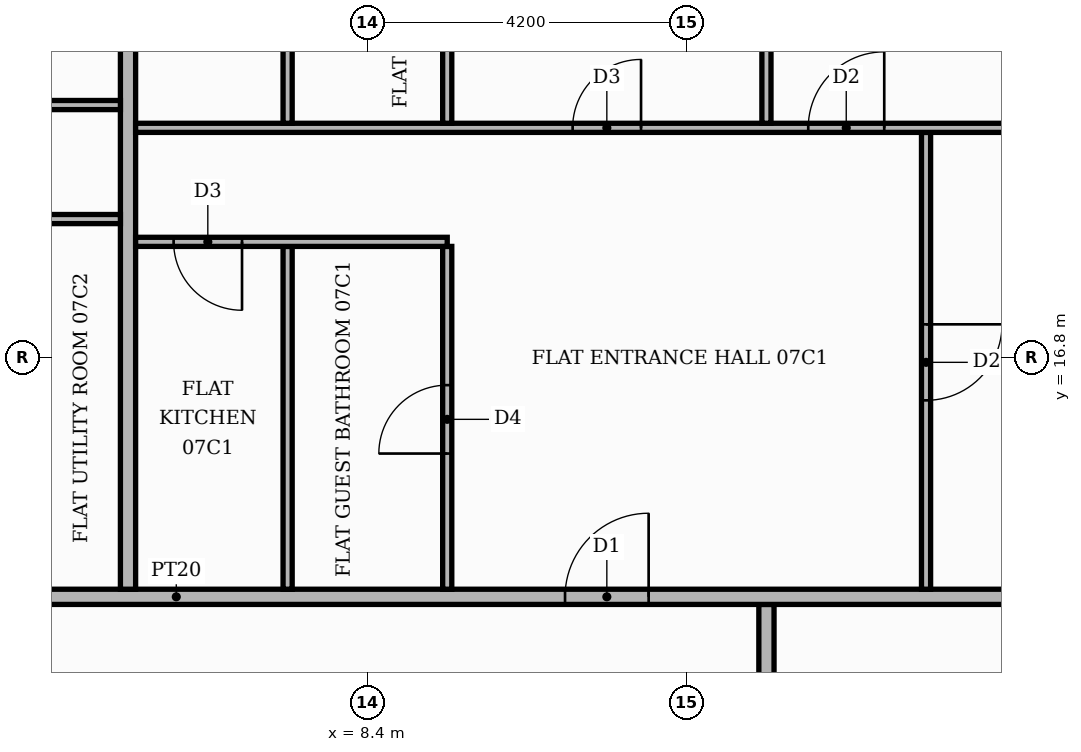
"""IFC4 building model, lengths in metres.
Left out: names, types, materials, properties, quantities, classifications, styles, units other than length and angle.
Written with IfcOpenShell. Run it as: python <this file> out.ifc"""

import sys

from ifc_helpers import new_model, si_unit, direction, frame, frame_2d, origin, place, context, subcontext, project, spatial, rectangle, extrude, element, fill, save


model = new_model("IFC4")
c1 = context("Model", 3, precision=1e-05, world=origin(), true_north=direction((0.0, 1.0)))
c2 = subcontext(c1, "Body", "Model", "MODEL_VIEW")
j1 = project(units=[si_unit("LENGTHUNIT", "METRE"), si_unit("PLANEANGLEUNIT", "RADIAN")], contexts=[c1])
p1 = place(None, origin())
s1 = spatial("IfcSite", under=j1, at=p1, CompositionType="ELEMENT")
p2 = place(p1, origin())
s2 = spatial("IfcBuilding", under=s1, at=p2, CompositionType="ELEMENT")
p3 = place(p2, frame((0.0, 0.0, 34.8)))
s3 = spatial("IfcBuildingStorey", under=s2, at=p3, CompositionType="ELEMENT", Elevation=34.8)
p4 = place(p3, frame((13.65, -5.15, 0.0), z_axis=(0.0, 0.0, 1.0), x_axis=(0.0, 1.0, 0.0)))
e1 = element("IfcWall", 1, at=p4, inside=s3, PredefinedType="PARTITIONING", context=c2, shape_type="SweptSolid", body=[
    extrude(rectangle(XDim=18.7, YDim=0.2, at=frame_2d((9.35, 0.0))), origin(), (0.0, 0.0, 1.0), 3.48),
])
p5 = place(p4, frame((3.55, 0.0, 0.0)))
e2 = element("IfcOpeningElement", 2, at=p5, cuts=e1, PredefinedType="OPENING", context=c2, shape_type="SweptSolid", body=[
    extrude(rectangle(XDim=1.1, YDim=2.4, at=frame_2d((0.55, 1.2))), frame((0.0, 0.11, 0.0), z_axis=(0.0, -1.0, 0.0), x_axis=(1.0, 0.0, 0.0)), (0.0, 0.0, 1.0), 0.22),
])
p6 = place(p3, frame((-13.65, 13.65, 0.0), z_axis=(0.0, 0.0, 1.0), x_axis=(1.0, 0.0, 0.0)))
e3 = element("IfcWall", 3, at=p6, inside=s3, PredefinedType="PARTITIONING", context=c2, shape_type="SweptSolid", body=[
    extrude(rectangle(XDim=39.07, YDim=0.2, at=frame_2d((19.535, 0.0))), origin(), (0.0, 0.0, 1.0), 3.48),
])
p7 = place(p6, frame((24.65, 0.0, 0.0)))
e4 = element("IfcOpeningElement", 4, at=p7, cuts=e3, PredefinedType="OPENING", context=c2, shape_type="SweptSolid", body=[
    extrude(rectangle(XDim=1.1, YDim=2.4, at=frame_2d((0.55, 1.2))), frame((0.0, 0.11, 0.0), z_axis=(0.0, -1.0, 0.0), x_axis=(1.0, 0.0, 0.0)), (0.0, 0.0, 1.0), 0.22),
])
p8 = place(p6, frame((14.15, 0.0, 0.0)))
e5 = element("IfcOpeningElement", 5, at=p8, cuts=e3, PredefinedType="OPENING", context=c2, shape_type="SweptSolid", body=[
    extrude(rectangle(XDim=1.1, YDim=2.4, at=frame_2d((0.55, 1.2))), frame((0.0, 0.11, 0.0), z_axis=(0.0, -1.0, 0.0), x_axis=(1.0, 0.0, 0.0)), (0.0, 0.0, 1.0), 0.22),
])
p9 = place(p3, frame((5.25, 13.75, 0.0), z_axis=(0.0, 0.0, 1.0), x_axis=(0.0, 1.0, 0.0)))
e6 = element("IfcWall", 6, at=p9, inside=s3, PredefinedType="PARTITIONING", context=c2, shape_type="SweptSolid", body=[
    extrude(rectangle(XDim=11.67, YDim=0.2, at=frame_2d((5.835, 0.0))), origin(), (0.0, 0.0, 1.0), 3.48),
])
p10 = place(p3, frame((7.35, 13.75, 0.0), z_axis=(0.0, 0.0, 1.0), x_axis=(0.0, 1.0, 0.0)))
e7 = element("IfcWall", 7, at=p10, inside=s3, PredefinedType="PARTITIONING", context=c2, shape_type="SweptSolid", body=[
    extrude(rectangle(XDim=4.51, YDim=0.12, at=frame_2d((2.255, 0.0))), origin(), (0.0, 0.0, 1.0), 3.48),
])
p11 = place(p3, frame((9.45, 13.75, 0.0), z_axis=(0.0, 0.0, 1.0), x_axis=(0.0, 1.0, 0.0)))
e8 = element("IfcWall", 8, at=p11, inside=s3, PredefinedType="PARTITIONING", context=c2, shape_type="SweptSolid", body=[
    extrude(rectangle(XDim=4.51, YDim=0.12, at=frame_2d((2.255, 0.0))), origin(), (0.0, 0.0, 1.0), 3.48),
])
p12 = place(p11, frame((1.785, 0.0, 0.0)))
e9 = element("IfcOpeningElement", 9, at=p12, cuts=e8, PredefinedType="OPENING", context=c2, shape_type="SweptSolid", body=[
    extrude(rectangle(XDim=0.9, YDim=2.1, at=frame_2d((0.45, 1.05))), frame((0.0, 0.07, 0.0), z_axis=(0.0, -1.0, 0.0), x_axis=(1.0, 0.0, 0.0)), (0.0, 0.0, 1.0), 0.14),
])
p13 = place(p3, frame((15.75, 13.75, 0.0), z_axis=(0.0, 0.0, 1.0), x_axis=(0.0, 1.0, 0.0)))
e10 = element("IfcWall", 10, at=p13, inside=s3, PredefinedType="PARTITIONING", context=c2, shape_type="SweptSolid", body=[
    extrude(rectangle(XDim=6.01, YDim=0.12, at=frame_2d((3.005, 0.0))), origin(), (0.0, 0.0, 1.0), 3.48),
])
p14 = place(p13, frame((2.485, 0.0, 0.0)))
e11 = element("IfcOpeningElement", 11, at=p14, cuts=e10, PredefinedType="OPENING", context=c2, shape_type="SweptSolid", body=[
    extrude(rectangle(XDim=1.0, YDim=2.1, at=frame_2d((0.5, 1.05))), frame((0.0, 0.07, 0.0), z_axis=(0.0, -1.0, 0.0), x_axis=(1.0, 0.0, 0.0)), (0.0, 0.0, 1.0), 0.14),
])
p15 = place(p3, frame((5.35, 18.32, 0.0), z_axis=(0.0, 0.0, 1.0), x_axis=(1.0, 0.0, 0.0)))
e12 = element("IfcWall", 12, at=p15, inside=s3, PredefinedType="PARTITIONING", context=c2, shape_type="SweptSolid", body=[
    extrude(rectangle(XDim=4.1, YDim=0.12, at=frame_2d((2.05, 0.0))), origin(), (0.0, 0.0, 1.0), 3.48),
])
p16 = place(p15, frame((0.5, 0.0, 0.0)))
e13 = element("IfcOpeningElement", 13, at=p16, cuts=e12, PredefinedType="OPENING", context=c2, shape_type="SweptSolid", body=[
    extrude(rectangle(XDim=0.9, YDim=2.1, at=frame_2d((0.45, 1.05))), frame((0.0, 0.07, 0.0), z_axis=(0.0, -1.0, 0.0), x_axis=(1.0, 0.0, 0.0)), (0.0, 0.0, 1.0), 0.14),
])
p17 = place(p3, frame((3.15, 18.62, 0.0), z_axis=(0.0, 0.0, 1.0), x_axis=(1.0, 0.0, 0.0)))
e14 = element("IfcWall", 14, at=p17, inside=s3, PredefinedType="PARTITIONING", context=c2, shape_type="SweptSolid", body=[
    extrude(rectangle(XDim=2.0, YDim=0.12, at=frame_2d((1.0, 0.0))), origin(), (0.0, 0.0, 1.0), 3.48),
])
p18 = place(p3, frame((5.35, 19.82, 0.0), z_axis=(0.0, 0.0, 1.0), x_axis=(1.0, 0.0, 0.0)))
e15 = element("IfcWall", 15, at=p18, inside=s3, PredefinedType="PARTITIONING", context=c2, shape_type="SweptSolid", body=[
    extrude(rectangle(XDim=11.95, YDim=0.12, at=frame_2d((5.975, 0.0))), origin(), (0.0, 0.0, 1.0), 3.48),
])
p19 = place(p18, frame((8.85, 0.0, 0.0)))
e16 = element("IfcOpeningElement", 16, at=p19, cuts=e15, PredefinedType="OPENING", context=c2, shape_type="SweptSolid", body=[
    extrude(rectangle(XDim=1.0, YDim=2.1, at=frame_2d((0.5, 1.05))), frame((0.0, 0.07, 0.0), z_axis=(0.0, -1.0, 0.0), x_axis=(1.0, 0.0, 0.0)), (0.0, 0.0, 1.0), 0.14),
])
p20 = place(p18, frame((5.75, 0.0, 0.0)))
e17 = element("IfcOpeningElement", 17, at=p20, cuts=e15, PredefinedType="OPENING", context=c2, shape_type="SweptSolid", body=[
    extrude(rectangle(XDim=0.9, YDim=2.1, at=frame_2d((0.45, 1.05))), frame((0.0, 0.07, 0.0), z_axis=(0.0, -1.0, 0.0), x_axis=(1.0, 0.0, 0.0)), (0.0, 0.0, 1.0), 0.14),
])
p21 = place(p3, frame((7.35, 19.88, 0.0), z_axis=(0.0, 0.0, 1.0), x_axis=(0.0, 1.0, 0.0)))
e18 = element("IfcWall", 18, at=p21, inside=s3, PredefinedType="PARTITIONING", context=c2, shape_type="SweptSolid", body=[
    extrude(rectangle(XDim=5.54, YDim=0.12, at=frame_2d((2.77, 0.0))), origin(), (0.0, 0.0, 1.0), 3.48),
])
p22 = place(p21, frame((2.44, 0.0, 0.0)))
e19 = element("IfcOpeningElement", 19, at=p22, cuts=e18, PredefinedType="OPENING", context=c2, shape_type="SweptSolid", body=[
    extrude(rectangle(XDim=0.9, YDim=2.1, at=frame_2d((0.45, 1.05))), frame((0.0, 0.07, 0.0), z_axis=(0.0, -1.0, 0.0), x_axis=(1.0, 0.0, 0.0)), (0.0, 0.0, 1.0), 0.14),
])
p23 = place(p3, frame((9.45, 19.88, 0.0), z_axis=(0.0, 0.0, 1.0), x_axis=(0.0, 1.0, 0.0)))
e20 = element("IfcWall", 20, at=p23, inside=s3, PredefinedType="PARTITIONING", context=c2, shape_type="SweptSolid", body=[
    extrude(rectangle(XDim=5.54, YDim=0.12, at=frame_2d((2.77, 0.0))), origin(), (0.0, 0.0, 1.0), 3.48),
])
p24 = place(p23, frame((2.44, 0.0, 0.0)))
e21 = element("IfcOpeningElement", 21, at=p24, cuts=e20, PredefinedType="OPENING", context=c2, shape_type="SweptSolid", body=[
    extrude(rectangle(XDim=0.9, YDim=2.1, at=frame_2d((0.45, 1.05))), frame((0.0, 0.07, 0.0), z_axis=(0.0, -1.0, 0.0), x_axis=(1.0, 0.0, 0.0)), (0.0, 0.0, 1.0), 0.14),
])
p25 = place(p3, frame((13.65, 19.88, 0.0), z_axis=(0.0, 0.0, 1.0), x_axis=(0.0, 1.0, 0.0)))
e22 = element("IfcWall", 22, at=p25, inside=s3, PredefinedType="PARTITIONING", context=c2, shape_type="SweptSolid", body=[
    extrude(rectangle(XDim=5.54, YDim=0.12, at=frame_2d((2.77, 0.0))), origin(), (0.0, 0.0, 1.0), 3.48),
])
p26 = place(p3, frame((-13.55, 20.12, 0.0), z_axis=(0.0, 0.0, 1.0), x_axis=(1.0, 0.0, 0.0)))
e23 = element("IfcWall", 23, at=p26, inside=s3, PredefinedType="PARTITIONING", context=c2, shape_type="SweptSolid", body=[
    extrude(rectangle(XDim=18.7, YDim=0.12, at=frame_2d((9.35, 0.0))), origin(), (0.0, 0.0, 1.0), 3.48),
])
p27 = place(p26, frame((16.2, 0.0, 0.0)))
e24 = element("IfcOpeningElement", 24, at=p27, cuts=e23, PredefinedType="OPENING", context=c2, shape_type="SweptSolid", body=[
    extrude(rectangle(XDim=1.0, YDim=2.1, at=frame_2d((0.5, 1.05))), frame((0.0, 0.07, 0.0), z_axis=(0.0, -1.0, 0.0), x_axis=(1.0, 0.0, 0.0)), (0.0, 0.0, 1.0), 0.14),
])
p28 = place(p26, frame((12.05, 0.0, 0.0)))
e25 = element("IfcOpeningElement", 25, at=p28, cuts=e23, PredefinedType="OPENING", context=c2, shape_type="SweptSolid", body=[
    extrude(rectangle(XDim=0.9, YDim=2.1, at=frame_2d((0.45, 1.05))), frame((0.0, 0.07, 0.0), z_axis=(0.0, -1.0, 0.0), x_axis=(1.0, 0.0, 0.0)), (0.0, 0.0, 1.0), 0.14),
])
p29 = place(p26, frame((3.65, 0.0, 0.0)))
e26 = element("IfcOpeningElement", 26, at=p29, cuts=e23, PredefinedType="OPENING", context=c2, shape_type="SweptSolid", body=[
    extrude(rectangle(XDim=0.9, YDim=2.1, at=frame_2d((0.45, 1.05))), frame((0.0, 0.07, 0.0), z_axis=(0.0, -1.0, 0.0), x_axis=(1.0, 0.0, 0.0)), (0.0, 0.0, 1.0), 0.14),
])
p30 = place(p7, origin())
e27 = element("IfcDoor", 27, at=p30, inside=s3, OperationType="SINGLE_SWING_RIGHT", PredefinedType="DOOR", context=c2, shape_type="SweptSolid", body=[
    extrude(rectangle(XDim=1.1, YDim=2.4, at=frame_2d((0.55, 1.2))), frame((0.0, 0.025, 0.0), z_axis=(0.0, -1.0, 0.0), x_axis=(1.0, 0.0, 0.0)), (0.0, 0.0, 1.0), 0.05),
])
fill(e4, e27)
p31 = place(p14, frame((1.0, 0.0, 0.0), z_axis=(0.0, 0.0, 1.0), x_axis=(-1.0, 0.0, 0.0)))
e28 = element("IfcDoor", 28, at=p31, inside=s3, OperationType="SINGLE_SWING_RIGHT", PredefinedType="DOOR", context=c2, shape_type="SweptSolid", body=[
    extrude(rectangle(XDim=1.0, YDim=2.1, at=frame_2d((0.5, 1.05))), frame((0.0, 0.025, 0.0), z_axis=(0.0, -1.0, 0.0), x_axis=(1.0, 0.0, 0.0)), (0.0, 0.0, 1.0), 0.05),
])
fill(e11, e28)
p32 = place(p12, origin())
e29 = element("IfcDoor", 29, at=p32, inside=s3, OperationType="SINGLE_SWING_LEFT", PredefinedType="DOOR", context=c2, shape_type="SweptSolid", body=[
    extrude(rectangle(XDim=0.9, YDim=2.1, at=frame_2d((0.45, 1.05))), frame((0.0, 0.025, 0.0), z_axis=(0.0, -1.0, 0.0), x_axis=(1.0, 0.0, 0.0)), (0.0, 0.0, 1.0), 0.05),
])
fill(e9, e29)
p33 = place(p16, frame((0.9, 0.0, 0.0), z_axis=(0.0, 0.0, 1.0), x_axis=(-1.0, 0.0, 0.0)))
e30 = element("IfcDoor", 30, at=p33, inside=s3, OperationType="SINGLE_SWING_RIGHT", PredefinedType="DOOR", context=c2, shape_type="SweptSolid", body=[
    extrude(rectangle(XDim=0.9, YDim=2.1, at=frame_2d((0.45, 1.05))), frame((0.0, 0.025, 0.0), z_axis=(0.0, -1.0, 0.0), x_axis=(1.0, 0.0, 0.0)), (0.0, 0.0, 1.0), 0.05),
])
fill(e13, e30)
p34 = place(p19, origin())
e31 = element("IfcDoor", 31, at=p34, inside=s3, OperationType="SINGLE_SWING_RIGHT", PredefinedType="DOOR", context=c2, shape_type="SweptSolid", body=[
    extrude(rectangle(XDim=1.0, YDim=2.1, at=frame_2d((0.5, 1.05))), frame((0.0, 0.025, 0.0), z_axis=(0.0, -1.0, 0.0), x_axis=(1.0, 0.0, 0.0)), (0.0, 0.0, 1.0), 0.05),
])
fill(e16, e31)
p35 = place(p20, origin())
e32 = element("IfcDoor", 32, at=p35, inside=s3, OperationType="SINGLE_SWING_RIGHT", PredefinedType="DOOR", context=c2, shape_type="SweptSolid", body=[
    extrude(rectangle(XDim=0.9, YDim=2.1, at=frame_2d((0.45, 1.05))), frame((0.0, 0.025, 0.0), z_axis=(0.0, -1.0, 0.0), x_axis=(1.0, 0.0, 0.0)), (0.0, 0.0, 1.0), 0.05),
])
fill(e17, e32)
save(model, sys.argv[1])
